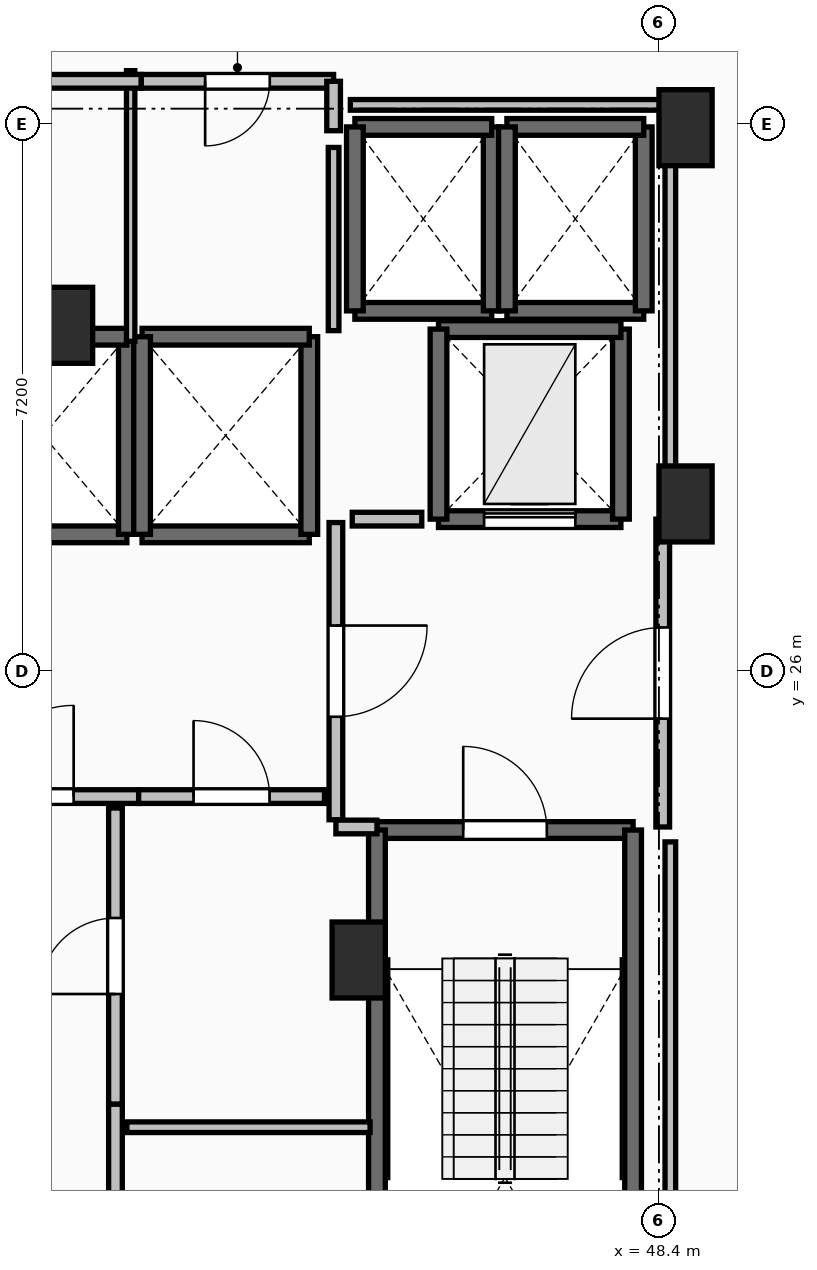
"""IFC4 building model, lengths in metres.
Left out: names, types, materials, properties, quantities, classifications, styles, units other than length and angle.
Written with IfcOpenShell. Run it as: python <this file> out.ifc"""

import sys

from ifc_helpers import new_model, si_unit, direction, frame, frame_2d, origin, origin_2d, place, context, subcontext, project, spatial, rectangle, extrude, element, fill, save


model = new_model("IFC4")
c1 = context("Model", 3, precision=1e-05, world=origin(), true_north=direction((0.0, 1.0)))
c2 = subcontext(c1, "Body", "Model", "MODEL_VIEW")
j1 = project(units=[si_unit("LENGTHUNIT", "METRE"), si_unit("PLANEANGLEUNIT", "RADIAN")], contexts=[c1])
p1 = place(None, origin())
s1 = spatial("IfcSite", under=j1, at=p1, CompositionType="ELEMENT")
p2 = place(p1, origin())
s2 = spatial("IfcBuilding", under=s1, at=p2, CompositionType="ELEMENT")
p3 = place(p2, frame((0.0, 0.0, 214.3)))
s3 = spatial("IfcBuildingStorey", under=s2, at=p3, CompositionType="ELEMENT", Elevation=214.3)
for number, where, z_axis, x_axis in (
    (1, (48.75, 33.15, 0.0), (0.0, 0.0, 1.0), (1.0, 0.0, 0.0)),
    (2, (48.75, 28.2, 0.0), (0.0, 0.0, 1.0), (1.0, 0.0, 0.0)),
    (3, (44.45, 22.2, 0.0), (0.0, 0.0, 1.0), (1.0, 0.0, 0.0)),
    (4, (40.6, 30.55, 0.0), (0.0, 0.0, 1.0), (1.0, 0.0, 0.0)),
):
    element("IfcColumn", number, at=place(p3, frame(where, z_axis=z_axis, x_axis=x_axis)), inside=s3, PredefinedType="PILASTER", context=c2, shape_type="SweptSolid", body=[
        extrude(rectangle(XDim=0.7, YDim=1.0, at=origin_2d()), origin(), (0.0, 0.0, 1.0), 3.55),
    ])
p4 = place(p3, frame((44.69, 23.91, 0.0), z_axis=(0.0, 0.0, 1.0), x_axis=(1.0, 0.0, 0.0)))
e5 = element("IfcWall", 5, at=p4, inside=s3, PredefinedType="SOLIDWALL", context=c2, shape_type="SweptSolid", body=[
    extrude(rectangle(XDim=3.37, YDim=0.22, at=frame_2d((1.685, 0.0))), origin(), (0.0, 0.0, 1.0), 3.29),
])
p5 = place(p4, frame((1.135, 0.0, 0.0)))
e6 = element("IfcOpeningElement", 6, at=p5, cuts=e5, PredefinedType="OPENING", context=c2, shape_type="SweptSolid", body=[
    extrude(rectangle(XDim=1.1, YDim=2.15, at=frame_2d((0.55, 1.075))), frame((0.0, 0.125, 0.0), z_axis=(0.0, -1.0, 0.0), x_axis=(1.0, 0.0, 0.0)), (0.0, 0.0, 1.0), 0.25),
])
for number, where, z_axis, x_axis in (
    (7, (48.06, 23.91, 0.0), (0.0, 0.0, 1.0), (0.0, -1.0, 0.0)),
    (8, (44.69, 16.49, 0.0), (0.0, 0.0, 1.0), (0.0, 1.0, 0.0)),
):
    element("IfcWall", number, at=place(p3, frame(where, z_axis=z_axis, x_axis=x_axis)), inside=s3, PredefinedType="SOLIDWALL", context=c2, shape_type="SweptSolid", body=[
        extrude(rectangle(XDim=7.42, YDim=0.22, at=frame_2d((3.71, 0.0))), origin(), (0.0, 0.0, 1.0), 3.29),
    ])
p6 = place(p3, frame((39.2, 27.8, 0.0), z_axis=(0.0, 0.0, 1.0), x_axis=(1.0, 0.0, 0.0)))
e9 = element("IfcWall", 9, at=p6, inside=s3, PredefinedType="SOLIDWALL", context=c2, shape_type="SweptSolid", body=[
    extrude(rectangle(XDim=2.2, YDim=0.22, at=frame_2d((1.1, 0.0))), origin(), (0.0, 0.0, 1.0), 3.29),
])
p7 = place(p3, frame((41.4, 27.8, 0.0), z_axis=(0.0, 0.0, 1.0), x_axis=(0.0, 1.0, 0.0)))
e10 = element("IfcWall", 10, at=p7, inside=s3, PredefinedType="SOLIDWALL", context=c2, shape_type="SweptSolid", body=[
    extrude(rectangle(XDim=2.6, YDim=0.22, at=frame_2d((1.3, 0.0))), origin(), (0.0, 0.0, 1.0), 3.29),
])
for number, where, z_axis, x_axis in (
    (11, (41.4, 30.4, 0.0), (0.0, 0.0, 1.0), (-1.0, 0.0, 0.0)),
    (12, (41.6, 27.8, 0.0), (0.0, 0.0, 1.0), (1.0, 0.0, 0.0)),
):
    element("IfcWall", number, at=place(p3, frame(where, z_axis=z_axis, x_axis=x_axis)), inside=s3, PredefinedType="SOLIDWALL", context=c2, shape_type="SweptSolid", body=[
        extrude(rectangle(XDim=2.2, YDim=0.22, at=frame_2d((1.1, 0.0))), origin(), (0.0, 0.0, 1.0), 3.29),
    ])
p8 = place(p3, frame((43.8, 27.8, 0.0), z_axis=(0.0, 0.0, 1.0), x_axis=(0.0, 1.0, 0.0)))
e13 = element("IfcWall", 13, at=p8, inside=s3, PredefinedType="SOLIDWALL", context=c2, shape_type="SweptSolid", body=[
    extrude(rectangle(XDim=2.6, YDim=0.22, at=frame_2d((1.3, 0.0))), origin(), (0.0, 0.0, 1.0), 3.29),
])
p9 = place(p3, frame((43.8, 30.4, 0.0), z_axis=(0.0, 0.0, 1.0), x_axis=(-1.0, 0.0, 0.0)))
e14 = element("IfcWall", 14, at=p9, inside=s3, PredefinedType="SOLIDWALL", context=c2, shape_type="SweptSolid", body=[
    extrude(rectangle(XDim=2.2, YDim=0.22, at=frame_2d((1.1, 0.0))), origin(), (0.0, 0.0, 1.0), 3.29),
])
p10 = place(p3, frame((41.6, 30.4, 0.0), z_axis=(0.0, 0.0, 1.0), x_axis=(0.0, -1.0, 0.0)))
e15 = element("IfcWall", 15, at=p10, inside=s3, PredefinedType="SOLIDWALL", context=c2, shape_type="SweptSolid", body=[
    extrude(rectangle(XDim=2.6, YDim=0.22, at=frame_2d((1.3, 0.0))), origin(), (0.0, 0.0, 1.0), 3.29),
])
p11 = place(p3, frame((44.4, 30.74, 0.0), z_axis=(0.0, 0.0, 1.0), x_axis=(1.0, 0.0, 0.0)))
e16 = element("IfcWall", 16, at=p11, inside=s3, PredefinedType="SOLIDWALL", context=c2, shape_type="SweptSolid", body=[
    extrude(rectangle(XDim=1.8, YDim=0.22, at=frame_2d((0.9, 0.0))), origin(), (0.0, 0.0, 1.0), 3.29),
])
p12 = place(p3, frame((46.2, 30.74, 0.0), z_axis=(0.0, 0.0, 1.0), x_axis=(0.0, 1.0, 0.0)))
e17 = element("IfcWall", 17, at=p12, inside=s3, PredefinedType="SOLIDWALL", context=c2, shape_type="SweptSolid", body=[
    extrude(rectangle(XDim=2.42, YDim=0.22, at=frame_2d((1.21, 0.0))), origin(), (0.0, 0.0, 1.0), 3.29),
])
p13 = place(p3, frame((46.2, 33.16, 0.0), z_axis=(0.0, 0.0, 1.0), x_axis=(-1.0, 0.0, 0.0)))
e18 = element("IfcWall", 18, at=p13, inside=s3, PredefinedType="SOLIDWALL", context=c2, shape_type="SweptSolid", body=[
    extrude(rectangle(XDim=1.8, YDim=0.22, at=frame_2d((0.9, 0.0))), origin(), (0.0, 0.0, 1.0), 3.29),
])
p14 = place(p3, frame((44.4, 33.16, 0.0), z_axis=(0.0, 0.0, 1.0), x_axis=(0.0, -1.0, 0.0)))
e19 = element("IfcWall", 19, at=p14, inside=s3, PredefinedType="SOLIDWALL", context=c2, shape_type="SweptSolid", body=[
    extrude(rectangle(XDim=2.42, YDim=0.22, at=frame_2d((1.21, 0.0))), origin(), (0.0, 0.0, 1.0), 3.29),
])
p15 = place(p3, frame((46.4, 30.74, 0.0), z_axis=(0.0, 0.0, 1.0), x_axis=(1.0, 0.0, 0.0)))
e20 = element("IfcWall", 20, at=p15, inside=s3, PredefinedType="SOLIDWALL", context=c2, shape_type="SweptSolid", body=[
    extrude(rectangle(XDim=1.8, YDim=0.22, at=frame_2d((0.9, 0.0))), origin(), (0.0, 0.0, 1.0), 3.29),
])
p16 = place(p3, frame((48.2, 30.74, 0.0), z_axis=(0.0, 0.0, 1.0), x_axis=(0.0, 1.0, 0.0)))
e21 = element("IfcWall", 21, at=p16, inside=s3, PredefinedType="SOLIDWALL", context=c2, shape_type="SweptSolid", body=[
    extrude(rectangle(XDim=2.42, YDim=0.22, at=frame_2d((1.21, 0.0))), origin(), (0.0, 0.0, 1.0), 3.29),
])
p17 = place(p3, frame((48.2, 33.16, 0.0), z_axis=(0.0, 0.0, 1.0), x_axis=(-1.0, 0.0, 0.0)))
e22 = element("IfcWall", 22, at=p17, inside=s3, PredefinedType="SOLIDWALL", context=c2, shape_type="SweptSolid", body=[
    extrude(rectangle(XDim=1.8, YDim=0.22, at=frame_2d((0.9, 0.0))), origin(), (0.0, 0.0, 1.0), 3.29),
])
p18 = place(p3, frame((46.4, 33.16, 0.0), z_axis=(0.0, 0.0, 1.0), x_axis=(0.0, -1.0, 0.0)))
e23 = element("IfcWall", 23, at=p18, inside=s3, PredefinedType="SOLIDWALL", context=c2, shape_type="SweptSolid", body=[
    extrude(rectangle(XDim=2.42, YDim=0.22, at=frame_2d((1.21, 0.0))), origin(), (0.0, 0.0, 1.0), 3.29),
])
p19 = place(p3, frame((45.5, 28.0, 0.0), z_axis=(0.0, 0.0, 1.0), x_axis=(1.0, 0.0, 0.0)))
e24 = element("IfcWall", 24, at=p19, inside=s3, PredefinedType="SHEAR", context=c2, shape_type="SweptSolid", body=[
    extrude(rectangle(XDim=2.4, YDim=0.22, at=frame_2d((1.2, 0.0))), origin(), (0.0, 0.0, 1.0), 3.29),
])
p20 = place(p19, frame((0.6, 0.0, 0.0)))
e25 = element("IfcOpeningElement", 25, at=p20, cuts=e24, PredefinedType="OPENING", context=c2, shape_type="SweptSolid", body=[
    extrude(rectangle(XDim=1.2, YDim=2.2, at=frame_2d((0.6, 1.1))), frame((0.0, 0.125, 0.0), z_axis=(0.0, -1.0, 0.0), x_axis=(1.0, 0.0, 0.0)), (0.0, 0.0, 1.0), 0.25),
])
p21 = place(p3, frame((47.9, 28.0, 0.0), z_axis=(0.0, 0.0, 1.0), x_axis=(0.0, 1.0, 0.0)))
e26 = element("IfcWall", 26, at=p21, inside=s3, PredefinedType="SHEAR", context=c2, shape_type="SweptSolid", body=[
    extrude(rectangle(XDim=2.5, YDim=0.22, at=frame_2d((1.25, 0.0))), origin(), (0.0, 0.0, 1.0), 3.29),
])
p22 = place(p3, frame((47.9, 30.5, 0.0), z_axis=(0.0, 0.0, 1.0), x_axis=(-1.0, 0.0, 0.0)))
e27 = element("IfcWall", 27, at=p22, inside=s3, PredefinedType="SHEAR", context=c2, shape_type="SweptSolid", body=[
    extrude(rectangle(XDim=2.4, YDim=0.22, at=frame_2d((1.2, 0.0))), origin(), (0.0, 0.0, 1.0), 3.29),
])
p23 = place(p3, frame((45.5, 30.5, 0.0), z_axis=(0.0, 0.0, 1.0), x_axis=(0.0, -1.0, 0.0)))
e28 = element("IfcWall", 28, at=p23, inside=s3, PredefinedType="SHEAR", context=c2, shape_type="SweptSolid", body=[
    extrude(rectangle(XDim=2.5, YDim=0.22, at=frame_2d((1.25, 0.0))), origin(), (0.0, 0.0, 1.0), 3.29),
])
p24 = place(p3, frame((44.15, 27.955, 0.0), z_axis=(0.0, 0.0, 1.0), x_axis=(0.0, -1.0, 0.0)))
e29 = element("IfcWall", 29, at=p24, inside=s3, PredefinedType="PARTITIONING", context=c2, shape_type="SweptSolid", body=[
    extrude(rectangle(XDim=3.91, YDim=0.18, at=frame_2d((1.955, 0.0))), origin(), (0.0, 0.0, 1.0), 3.29),
])
p25 = place(p24, frame((1.355, 0.0, 0.0)))
e30 = element("IfcOpeningElement", 30, at=p25, cuts=e29, PredefinedType="OPENING", context=c2, shape_type="SweptSolid", body=[
    extrude(rectangle(XDim=1.2, YDim=2.15, at=frame_2d((0.6, 1.075))), frame((0.0, 0.105, 0.0), z_axis=(0.0, -1.0, 0.0), x_axis=(1.0, 0.0, 0.0)), (0.0, 0.0, 1.0), 0.21),
])
p26 = place(p3, frame((44.15, 23.95, 0.0), z_axis=(0.0, 0.0, 1.0), x_axis=(1.0, 0.0, 0.0)))
e31 = element("IfcWall", 31, at=p26, inside=s3, PredefinedType="PARTITIONING", context=c2, shape_type="SweptSolid", body=[
    extrude(rectangle(XDim=0.54, YDim=0.18, at=frame_2d((0.27, 0.0))), origin(), (0.0, 0.0, 1.0), 3.29),
])
p27 = place(p3, frame((48.45, 23.95, 0.0), z_axis=(0.0, 0.0, 1.0), x_axis=(0.0, 1.0, 0.0)))
e32 = element("IfcWall", 32, at=p27, inside=s3, PredefinedType="PARTITIONING", context=c2, shape_type="SweptSolid", body=[
    extrude(rectangle(XDim=4.05, YDim=0.18, at=frame_2d((2.025, 0.0))), origin(), (0.0, 0.0, 1.0), 3.29),
])
p28 = place(p27, frame((1.425, 0.0, 0.0)))
e33 = element("IfcOpeningElement", 33, at=p28, cuts=e32, PredefinedType="OPENING", context=c2, shape_type="SweptSolid", body=[
    extrude(rectangle(XDim=1.2, YDim=2.15, at=frame_2d((0.6, 1.075))), frame((0.0, 0.105, 0.0), z_axis=(0.0, -1.0, 0.0), x_axis=(1.0, 0.0, 0.0)), (0.0, 0.0, 1.0), 0.21),
])
p29 = place(p3, frame((38.645, 24.35, 0.0), z_axis=(0.0, 0.0, 1.0), x_axis=(1.0, 0.0, 0.0)))
e34 = element("IfcWall", 34, at=p29, inside=s3, PredefinedType="PARTITIONING", context=c2, shape_type="SweptSolid", body=[
    extrude(rectangle(XDim=2.91, YDim=0.18, at=frame_2d((1.455, 0.0))), origin(), (0.0, 0.0, 1.0), 3.29),
])
p30 = place(p29, frame((0.855, 0.0, 0.0)))
e35 = element("IfcOpeningElement", 35, at=p30, cuts=e34, PredefinedType="OPENING", context=c2, shape_type="SweptSolid", body=[
    extrude(rectangle(XDim=1.2, YDim=2.15, at=frame_2d((0.6, 1.075))), frame((0.0, 0.105, 0.0), z_axis=(0.0, -1.0, 0.0), x_axis=(1.0, 0.0, 0.0)), (0.0, 0.0, 1.0), 0.21),
])
p31 = place(p3, frame((41.555, 24.35, 0.0), z_axis=(0.0, 0.0, 1.0), x_axis=(1.0, 0.0, 0.0)))
e36 = element("IfcWall", 36, at=p31, inside=s3, PredefinedType="PARTITIONING", context=c2, shape_type="SweptSolid", body=[
    extrude(rectangle(XDim=2.445, YDim=0.18, at=frame_2d((1.223, 0.0))), origin(), (0.0, 0.0, 1.0), 3.29),
])
p32 = place(p31, frame((0.722, 0.0, 0.0)))
e37 = element("IfcOpeningElement", 37, at=p32, cuts=e36, PredefinedType="OPENING", context=c2, shape_type="SweptSolid", body=[
    extrude(rectangle(XDim=1.0, YDim=2.15, at=frame_2d((0.5, 1.075))), frame((0.0, 0.105, 0.0), z_axis=(0.0, -1.0, 0.0), x_axis=(1.0, 0.0, 0.0)), (0.0, 0.0, 1.0), 0.21),
])
p33 = place(p3, frame((41.25, 16.32, 0.0), z_axis=(0.0, 0.0, 1.0), x_axis=(0.0, 1.0, 0.0)))
e38 = element("IfcWall", 38, at=p33, inside=s3, PredefinedType="PARTITIONING", context=c2, shape_type="SweptSolid", body=[
    extrude(rectangle(XDim=3.985, YDim=0.18, at=frame_2d((1.992, 0.0))), origin(), (0.0, 0.0, 1.0), 3.29),
])
p34 = place(p33, frame((1.593, 0.0, 0.0)))
e39 = element("IfcOpeningElement", 39, at=p34, cuts=e38, PredefinedType="OPENING", context=c2, shape_type="SweptSolid", body=[
    extrude(rectangle(XDim=0.8, YDim=2.05, at=frame_2d((0.4, 1.025))), frame((0.0, 0.105, 0.0), z_axis=(0.0, -1.0, 0.0), x_axis=(1.0, 0.0, 0.0)), (0.0, 0.0, 1.0), 0.21),
])
p35 = place(p3, frame((41.25, 20.305, 0.0), z_axis=(0.0, 0.0, 1.0), x_axis=(0.0, 1.0, 0.0)))
e40 = element("IfcWall", 40, at=p35, inside=s3, PredefinedType="PARTITIONING", context=c2, shape_type="SweptSolid", body=[
    extrude(rectangle(XDim=3.895, YDim=0.18, at=frame_2d((1.948, 0.0))), origin(), (0.0, 0.0, 1.0), 3.29),
])
p36 = place(p35, frame((1.448, 0.0, 0.0)))
e41 = element("IfcOpeningElement", 41, at=p36, cuts=e40, PredefinedType="OPENING", context=c2, shape_type="SweptSolid", body=[
    extrude(rectangle(XDim=1.0, YDim=2.15, at=frame_2d((0.5, 1.075))), frame((0.0, 0.105, 0.0), z_axis=(0.0, -1.0, 0.0), x_axis=(1.0, 0.0, 0.0)), (0.0, 0.0, 1.0), 0.21),
])
p37 = place(p3, frame((44.6, 20.0, 0.0), z_axis=(0.0, 0.0, 1.0), x_axis=(-1.0, 0.0, 0.0)))
e42 = element("IfcWall", 42, at=p37, inside=s3, PredefinedType="PARTITIONING", context=c2, shape_type="SweptSolid", body=[
    extrude(rectangle(XDim=3.2, YDim=0.14, at=frame_2d((1.6, 0.0))), origin(), (0.0, 0.0, 1.0), 3.29),
])
p38 = place(p3, frame((41.45, 30.34, 0.0), z_axis=(0.0, 0.0, 1.0), x_axis=(0.0, 1.0, 0.0)))
e43 = element("IfcWall", 43, at=p38, inside=s3, PredefinedType="PARTITIONING", context=c2, shape_type="SweptSolid", body=[
    extrude(rectangle(XDim=3.56, YDim=0.11, at=frame_2d((1.78, 0.0))), origin(), (0.0, 0.0, 1.0), 3.29),
])
p39 = place(p3, frame((41.59, 33.76, 0.0), z_axis=(0.0, 0.0, 1.0), x_axis=(-1.0, 0.0, 0.0)))
e44 = element("IfcWall", 44, at=p39, inside=s3, PredefinedType="PARTITIONING", context=c2, shape_type="SweptSolid", body=[
    extrude(rectangle(XDim=3.44, YDim=0.18, at=frame_2d((1.72, 0.0))), origin(), (0.0, 0.0, 1.0), 3.29),
])
p40 = place(p39, frame((1.295, 0.0, 0.0)))
e45 = element("IfcOpeningElement", 45, at=p40, cuts=e44, PredefinedType="OPENING", context=c2, shape_type="SweptSolid", body=[
    extrude(rectangle(XDim=0.85, YDim=2.1, at=frame_2d((0.425, 1.05))), frame((0.0, 0.105, 0.0), z_axis=(0.0, -1.0, 0.0), x_axis=(1.0, 0.0, 0.0)), (0.0, 0.0, 1.0), 0.21),
])
p41 = place(p3, frame((44.12, 33.76, 0.0), z_axis=(0.0, 0.0, 1.0), x_axis=(-1.0, 0.0, 0.0)))
e46 = element("IfcWall", 46, at=p41, inside=s3, PredefinedType="PARTITIONING", context=c2, shape_type="SweptSolid", body=[
    extrude(rectangle(XDim=2.53, YDim=0.18, at=frame_2d((1.265, 0.0))), origin(), (0.0, 0.0, 1.0), 3.29),
])
p42 = place(p41, frame((0.84, 0.0, 0.0)))
e47 = element("IfcOpeningElement", 47, at=p42, cuts=e46, PredefinedType="OPENING", context=c2, shape_type="SweptSolid", body=[
    extrude(rectangle(XDim=0.85, YDim=2.1, at=frame_2d((0.425, 1.05))), frame((0.0, 0.105, 0.0), z_axis=(0.0, -1.0, 0.0), x_axis=(1.0, 0.0, 0.0)), (0.0, 0.0, 1.0), 0.21),
])
p43 = place(p3, frame((44.12, 33.11, 0.0), z_axis=(0.0, 0.0, 1.0), x_axis=(0.0, 1.0, 0.0)))
e48 = element("IfcWall", 48, at=p43, inside=s3, PredefinedType="PARTITIONING", context=c2, shape_type="SweptSolid", body=[
    extrude(rectangle(XDim=0.65, YDim=0.18, at=frame_2d((0.325, 0.0))), origin(), (0.0, 0.0, 1.0), 3.29),
])
p44 = place(p3, frame((45.28, 28.0, 0.0), z_axis=(0.0, 0.0, 1.0), x_axis=(-1.0, 0.0, 0.0)))
e49 = element("IfcWall", 49, at=p44, inside=s3, PredefinedType="PARTITIONING", context=c2, shape_type="SweptSolid", body=[
    extrude(rectangle(XDim=0.915, YDim=0.18, at=frame_2d((0.458, 0.0))), origin(), (0.0, 0.0, 1.0), 3.29),
])
p45 = place(p3, frame((44.12, 30.48, 0.0), z_axis=(0.0, 0.0, 1.0), x_axis=(0.0, 1.0, 0.0)))
e50 = element("IfcWall", 50, at=p45, inside=s3, PredefinedType="PARTITIONING", context=c2, shape_type="SweptSolid", body=[
    extrude(rectangle(XDim=2.41, YDim=0.14, at=frame_2d((1.205, 0.0))), origin(), (0.0, 0.0, 1.0), 3.29),
])
p46 = place(p3, frame((48.55, 28.196, 0.0), z_axis=(0.0, 0.0, 1.0), x_axis=(0.0, 1.0, 0.0)))
e51 = element("IfcWall", 51, at=p46, inside=s3, PredefinedType="PARTITIONING", context=c2, shape_type="SweptSolid", body=[
    extrude(rectangle(XDim=5.254, YDim=0.14, at=frame_2d((2.627, 0.0))), origin(), (0.0, 0.0, 1.0), 2.482),
])
p47 = place(p3, frame((48.55, 33.45, 0.0), z_axis=(0.0, 0.0, 1.0), x_axis=(-1.0, 0.0, 0.0)))
e52 = element("IfcWall", 52, at=p47, inside=s3, PredefinedType="PARTITIONING", context=c2, shape_type="SweptSolid", body=[
    extrude(rectangle(XDim=4.21, YDim=0.14, at=frame_2d((2.105, 0.0))), origin(), (0.0, 0.0, 1.0), 2.482),
])
p48 = place(p3, frame((48.55, 16.24, 0.0), z_axis=(0.0, 0.0, 1.0), x_axis=(0.0, 1.0, 0.0)))
e53 = element("IfcWall", 53, at=p48, inside=s3, PredefinedType="PARTITIONING", context=c2, shape_type="SweptSolid", body=[
    extrude(rectangle(XDim=7.514, YDim=0.14, at=frame_2d((3.757, 0.0))), origin(), (0.0, 0.0, 1.0), 2.482),
])
p49 = place(p5, origin())
e54 = element("IfcDoor", 54, at=p49, inside=s3, OperationType="SINGLE_SWING_LEFT", PredefinedType="DOOR", context=c2, shape_type="SweptSolid", body=[
    extrude(rectangle(XDim=1.1, YDim=2.15, at=frame_2d((0.55, 1.075))), frame((0.0, 0.025, 0.0), z_axis=(0.0, -1.0, 0.0), x_axis=(1.0, 0.0, 0.0)), (0.0, 0.0, 1.0), 0.05),
])
fill(e6, e54)
p50 = place(p20, origin())
e55 = element("IfcDoor", 55, at=p50, inside=s3, OperationType="SLIDING_TO_LEFT", PredefinedType="DOOR", context=c2, shape_type="SweptSolid", body=[
    extrude(rectangle(XDim=1.2, YDim=2.2, at=frame_2d((0.6, 1.1))), frame((0.0, 0.025, 0.0), z_axis=(0.0, -1.0, 0.0), x_axis=(1.0, 0.0, 0.0)), (0.0, 0.0, 1.0), 0.05),
])
fill(e25, e55)
p51 = place(p25, origin())
e56 = element("IfcDoor", 56, at=p51, inside=s3, OperationType="SINGLE_SWING_LEFT", PredefinedType="DOOR", context=c2, shape_type="SweptSolid", body=[
    extrude(rectangle(XDim=1.2, YDim=2.15, at=frame_2d((0.6, 1.075))), frame((0.0, 0.025, 0.0), z_axis=(0.0, -1.0, 0.0), x_axis=(1.0, 0.0, 0.0)), (0.0, 0.0, 1.0), 0.05),
])
fill(e30, e56)
p52 = place(p28, origin())
e57 = element("IfcDoor", 57, at=p52, inside=s3, OperationType="SINGLE_SWING_LEFT", PredefinedType="DOOR", context=c2, shape_type="SweptSolid", body=[
    extrude(rectangle(XDim=1.2, YDim=2.15, at=frame_2d((0.6, 1.075))), frame((0.0, 0.025, 0.0), z_axis=(0.0, -1.0, 0.0), x_axis=(1.0, 0.0, 0.0)), (0.0, 0.0, 1.0), 0.05),
])
fill(e33, e57)
p53 = place(p30, origin())
e58 = element("IfcDoor", 58, at=p53, inside=s3, OperationType="SINGLE_SWING_RIGHT", PredefinedType="DOOR", context=c2, shape_type="SweptSolid", body=[
    extrude(rectangle(XDim=1.2, YDim=2.15, at=frame_2d((0.6, 1.075))), frame((0.0, 0.025, 0.0), z_axis=(0.0, -1.0, 0.0), x_axis=(1.0, 0.0, 0.0)), (0.0, 0.0, 1.0), 0.05),
])
fill(e35, e58)
p54 = place(p32, origin())
e59 = element("IfcDoor", 59, at=p54, inside=s3, OperationType="SINGLE_SWING_LEFT", PredefinedType="DOOR", context=c2, shape_type="SweptSolid", body=[
    extrude(rectangle(XDim=1.0, YDim=2.15, at=frame_2d((0.5, 1.075))), frame((0.0, 0.025, 0.0), z_axis=(0.0, -1.0, 0.0), x_axis=(1.0, 0.0, 0.0)), (0.0, 0.0, 1.0), 0.05),
])
fill(e37, e59)
p55 = place(p36, origin())
e60 = element("IfcDoor", 60, at=p55, inside=s3, OperationType="SINGLE_SWING_LEFT", PredefinedType="DOOR", context=c2, shape_type="SweptSolid", body=[
    extrude(rectangle(XDim=1.0, YDim=2.15, at=frame_2d((0.5, 1.075))), frame((0.0, 0.025, 0.0), z_axis=(0.0, -1.0, 0.0), x_axis=(1.0, 0.0, 0.0)), (0.0, 0.0, 1.0), 0.05),
])
fill(e41, e60)
p56 = place(p42, origin())
e61 = element("IfcDoor", 61, at=p56, inside=s3, OperationType="SINGLE_SWING_RIGHT", PredefinedType="DOOR", context=c2, shape_type="SweptSolid", body=[
    extrude(rectangle(XDim=0.85, YDim=2.1, at=frame_2d((0.425, 1.05))), frame((0.0, 0.025, 0.0), z_axis=(0.0, -1.0, 0.0), x_axis=(1.0, 0.0, 0.0)), (0.0, 0.0, 1.0), 0.05),
])
fill(e47, e61)
save(model, sys.argv[1])
